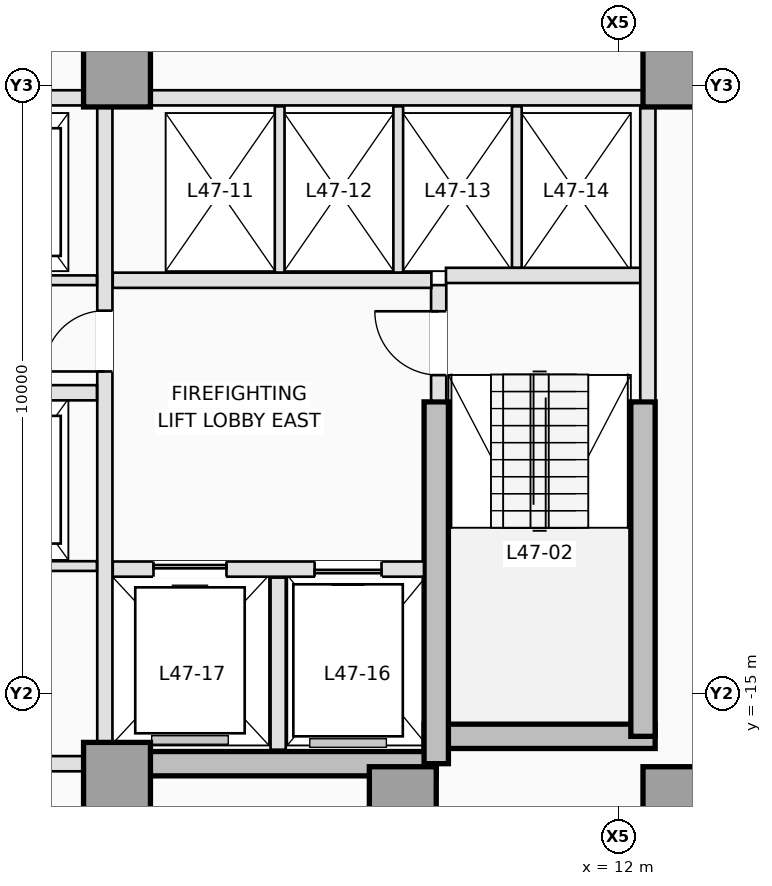
"""IFC4 building model, lengths in metres.
Left out: names, types, materials, properties, quantities, classifications, styles, units other than length and angle.
Written with IfcOpenShell. Run it as: python <this file> out.ifc"""

import sys

from ifc_helpers import new_model, si_unit, direction, frame, frame_2d, origin, origin_2d, place, context, subcontext, project, spatial, rectangle, extrude, element, fill, save


model = new_model("IFC4")
c1 = context("Model", 3, precision=1e-05, world=origin(), true_north=direction((0.0, 1.0)))
c2 = subcontext(c1, "Body", "Model", "MODEL_VIEW")
j1 = project(units=[si_unit("LENGTHUNIT", "METRE"), si_unit("PLANEANGLEUNIT", "RADIAN")], contexts=[c1])
p1 = place(None, origin())
s1 = spatial("IfcSite", under=j1, at=p1, CompositionType="ELEMENT")
p2 = place(p1, origin())
s2 = spatial("IfcBuilding", under=s1, at=p2, CompositionType="ELEMENT")
p3 = place(p2, frame((0.0, 0.0, 172.0)))
s3 = spatial("IfcBuildingStorey", under=s2, at=p3, CompositionType="ELEMENT", Elevation=172.0)
p4 = place(p3, frame((3.75, -16.15, 0.0), z_axis=(0.0, 0.0, 1.0), x_axis=(1.0, 0.0, 0.0)))
e1 = element("IfcWall", 1, at=p4, inside=s3, PredefinedType="SHEAR", context=c2, shape_type="SweptSolid", body=[
    extrude(rectangle(XDim=5.25, YDim=0.4, at=frame_2d((2.625, 0.0))), origin(), (0.0, 0.0, 1.0), 3.5),
])
p5 = place(p3, frame((8.8, -15.7, 0.0), z_axis=(0.0, 0.0, 1.0), x_axis=(1.0, 0.0, 0.0)))
e2 = element("IfcWall", 2, at=p5, inside=s3, PredefinedType="SHEAR", context=c2, shape_type="SweptSolid", body=[
    extrude(rectangle(XDim=3.8, YDim=0.4, at=frame_2d((1.9, 0.0))), origin(), (0.0, 0.0, 1.0), 3.5),
])
p6 = place(p3, frame((12.4, -15.7, 0.0), z_axis=(0.0, 0.0, 1.0), x_axis=(0.0, 1.0, 0.0)))
e3 = element("IfcWall", 3, at=p6, inside=s3, PredefinedType="SHEAR", context=c2, shape_type="SweptSolid", body=[
    extrude(rectangle(XDim=5.5, YDim=0.4, at=frame_2d((2.75, 0.0))), origin(), (0.0, 0.0, 1.0), 3.5),
])
p7 = place(p3, frame((9.0, -16.15, 0.0), z_axis=(0.0, 0.0, 1.0), x_axis=(0.0, 1.0, 0.0)))
e4 = element("IfcWall", 4, at=p7, inside=s3, PredefinedType="SHEAR", context=c2, shape_type="SweptSolid", body=[
    extrude(rectangle(XDim=5.95, YDim=0.4, at=frame_2d((2.975, 0.0))), origin(), (0.0, 0.0, 1.0), 3.5),
])
for number, where, z_axis, x_axis in (
    (5, (3.75, -16.35, 0.0), (0.0, 0.0, 1.0), (1.0, 0.0, 0.0)),
    (6, (8.45, -16.75, 0.0), (0.0, 0.0, 1.0), (1.0, 0.0, 0.0)),
    (7, (12.95, -16.75, 0.0), (0.0, 0.0, 1.0), (1.0, 0.0, 0.0)),
    (8, (3.75, -4.8, 0.0), (0.0, 0.0, 1.0), (1.0, 0.0, 0.0)),
    (9, (12.95, -4.8, 0.0), (0.0, 0.0, 1.0), (1.0, 0.0, 0.0)),
):
    element("IfcColumn", number, at=place(p3, frame(where, z_axis=z_axis, x_axis=x_axis)), inside=s3, PredefinedType="COLUMN", context=c2, shape_type="SweptSolid", body=[
        extrude(rectangle(XDim=1.1, YDim=1.1, at=origin_2d()), origin(), (0.0, 0.0, 1.0), 3.5),
    ])
p8 = place(p3, frame((9.04, -10.18, 0.0), z_axis=(0.0, 0.0, 1.0), x_axis=(0.0, 1.0, 0.0)))
e10 = element("IfcWall", 10, at=p8, inside=s3, PredefinedType="PARTITIONING", context=c2, shape_type="SweptSolid", body=[
    extrude(rectangle(XDim=1.9, YDim=0.25, at=frame_2d((0.95, 0.0))), origin(), (0.0, 0.0, 1.0), 3.25),
])
p9 = place(p8, frame((0.42, 0.0, 0.0)))
e11 = element("IfcOpeningElement", 11, at=p9, cuts=e10, PredefinedType="OPENING", context=c2, shape_type="SweptSolid", body=[
    extrude(rectangle(XDim=1.05, YDim=2.15, at=frame_2d((0.525, 1.075))), frame((0.0, 0.135, 0.0), z_axis=(0.0, -1.0, 0.0), x_axis=(1.0, 0.0, 0.0)), (0.0, 0.0, 1.0), 0.27),
])
p10 = place(p3, frame((9.16, -8.12, 0.0), z_axis=(0.0, 0.0, 1.0), x_axis=(1.0, 0.0, 0.0)))
e12 = element("IfcWall", 12, at=p10, inside=s3, PredefinedType="PARTITIONING", context=c2, shape_type="SweptSolid", body=[
    extrude(rectangle(XDim=3.22, YDim=0.25, at=frame_2d((1.61, 0.0))), origin(), (0.0, 0.0, 1.0), 3.25),
])
p11 = place(p3, frame((12.48, -10.18, 0.0), z_axis=(0.0, 0.0, 1.0), x_axis=(0.0, 1.0, 0.0)))
e13 = element("IfcWall", 13, at=p11, inside=s3, PredefinedType="PARTITIONING", context=c2, shape_type="SweptSolid", body=[
    extrude(rectangle(XDim=4.828, YDim=0.25, at=frame_2d((2.414, 0.0))), origin(), (0.0, 0.0, 1.0), 3.25),
])
p12 = place(p3, frame((3.68, -12.95, 0.0), z_axis=(0.0, 0.0, 1.0), x_axis=(1.0, 0.0, 0.0)))
e14 = element("IfcWall", 14, at=p12, inside=s3, PredefinedType="PARTITIONING", context=c2, shape_type="SweptSolid", body=[
    extrude(rectangle(XDim=5.118, YDim=0.25, at=frame_2d((2.559, 0.0))), origin(), (0.0, 0.0, 1.0), 3.25),
])
p13 = place(p12, frame((3.32, 0.0, 0.0)))
e15 = element("IfcOpeningElement", 15, at=p13, cuts=e14, PredefinedType="OPENING", context=c2, shape_type="SweptSolid", body=[
    extrude(rectangle(XDim=1.1, YDim=2.15, at=frame_2d((0.55, 1.075))), frame((0.0, 0.135, 0.0), z_axis=(0.0, -1.0, 0.0), x_axis=(1.0, 0.0, 0.0)), (0.0, 0.0, 1.0), 0.27),
])
p14 = place(p12, frame((0.67, 0.0, 0.0)))
e16 = element("IfcOpeningElement", 16, at=p14, cuts=e14, PredefinedType="OPENING", context=c2, shape_type="SweptSolid", body=[
    extrude(rectangle(XDim=1.2, YDim=2.15, at=frame_2d((0.6, 1.075))), frame((0.0, 0.135, 0.0), z_axis=(0.0, -1.0, 0.0), x_axis=(1.0, 0.0, 0.0)), (0.0, 0.0, 1.0), 0.27),
])
p15 = place(p3, frame((6.4, -15.92, 0.0), z_axis=(0.0, 0.0, 1.0), x_axis=(0.0, 1.0, 0.0)))
e17 = element("IfcWall", 17, at=p15, inside=s3, PredefinedType="PARTITIONING", context=c2, shape_type="SweptSolid", body=[
    extrude(rectangle(XDim=2.83, YDim=0.25, at=frame_2d((1.415, 0.0))), origin(), (0.0, 0.0, 1.0), 3.25),
])
p16 = place(p3, frame((3.68, -8.2, 0.0), z_axis=(0.0, 0.0, 1.0), x_axis=(1.0, 0.0, 0.0)))
e18 = element("IfcWall", 18, at=p16, inside=s3, PredefinedType="PARTITIONING", context=c2, shape_type="SweptSolid", body=[
    extrude(rectangle(XDim=5.24, YDim=0.25, at=frame_2d((2.62, 0.0))), origin(), (0.0, 0.0, 1.0), 3.25),
])
p17 = place(p3, frame((3.55, -15.798, 0.0), z_axis=(0.0, 0.0, 1.0), x_axis=(0.0, 1.0, 0.0)))
e19 = element("IfcWall", 19, at=p17, inside=s3, PredefinedType="PARTITIONING", context=c2, shape_type="SweptSolid", body=[
    extrude(rectangle(XDim=10.446, YDim=0.25, at=frame_2d((5.223, 0.0))), origin(), (0.0, 0.0, 1.0), 3.25),
])
p18 = place(p17, frame((6.098, 0.0, 0.0)))
e20 = element("IfcOpeningElement", 20, at=p18, cuts=e19, PredefinedType="OPENING", context=c2, shape_type="SweptSolid", body=[
    extrude(rectangle(XDim=1.0, YDim=2.15, at=frame_2d((0.5, 1.075))), frame((0.0, 0.135, 0.0), z_axis=(0.0, -1.0, 0.0), x_axis=(1.0, 0.0, 0.0)), (0.0, 0.0, 1.0), 0.27),
])
p19 = place(p3, frame((4.302, -5.2, 0.0), z_axis=(0.0, 0.0, 1.0), x_axis=(1.0, 0.0, 0.0)))
e21 = element("IfcWall", 21, at=p19, inside=s3, PredefinedType="PARTITIONING", context=c2, shape_type="SweptSolid", body=[
    extrude(rectangle(XDim=8.096, YDim=0.25, at=frame_2d((4.048, 0.0))), origin(), (0.0, 0.0, 1.0), 3.25),
])
p20 = place(p3, frame((0.95, -5.2, 0.0), z_axis=(0.0, 0.0, 1.0), x_axis=(1.0, 0.0, 0.0)))
e22 = element("IfcWall", 22, at=p20, inside=s3, PredefinedType="PARTITIONING", context=c2, shape_type="SweptSolid", body=[
    extrude(rectangle(XDim=2.248, YDim=0.25, at=frame_2d((1.124, 0.0))), origin(), (0.0, 0.0, 1.0), 3.25),
])
p21 = place(p20, frame((0.55, 0.0, 0.0)))
e23 = element("IfcOpeningElement", 23, at=p21, cuts=e22, PredefinedType="OPENING", context=c2, shape_type="SweptSolid", body=[
    extrude(rectangle(XDim=1.0, YDim=2.15, at=frame_2d((0.5, 1.075))), frame((0.0, 0.135, 0.0), z_axis=(0.0, -1.0, 0.0), x_axis=(1.0, 0.0, 0.0)), (0.0, 0.0, 1.0), 0.27),
])
for number, where, z_axis, x_axis in (
    (24, (6.425, -8.073, 0.0), (0.0, 0.0, 1.0), (0.0, 1.0, 0.0)),
    (25, (8.375, -8.073, 0.0), (0.0, 0.0, 1.0), (0.0, 1.0, 0.0)),
):
    element("IfcWall", number, at=place(p3, frame(where, z_axis=z_axis, x_axis=x_axis)), inside=s3, PredefinedType="PARTITIONING", context=c2, shape_type="SweptSolid", body=[
        extrude(rectangle(XDim=2.733, YDim=0.16, at=frame_2d((1.366, 0.0))), origin(), (0.0, 0.0, 1.0), 3.25),
    ])
p22 = place(p3, frame((10.325, -7.993, 0.0), z_axis=(0.0, 0.0, 1.0), x_axis=(0.0, 1.0, 0.0)))
e26 = element("IfcWall", 26, at=p22, inside=s3, PredefinedType="PARTITIONING", context=c2, shape_type="SweptSolid", body=[
    extrude(rectangle(XDim=2.653, YDim=0.16, at=frame_2d((1.326, 0.0))), origin(), (0.0, 0.0, 1.0), 3.25),
])
p23 = place(p3, frame((-3.198, -16.15, 0.0), z_axis=(0.0, 0.0, 1.0), x_axis=(1.0, 0.0, 0.0)))
e27 = element("IfcWall", 27, at=p23, inside=s3, PredefinedType="PARTITIONING", context=c2, shape_type="SweptSolid", body=[
    extrude(rectangle(XDim=6.396, YDim=0.25, at=frame_2d((3.198, 0.0))), origin(), (0.0, 0.0, 1.0), 2.45),
])
p24 = place(p3, frame((0.95, -8.2, 0.0), z_axis=(0.0, 0.0, 1.0), x_axis=(1.0, 0.0, 0.0)))
e28 = element("IfcWall", 28, at=p24, inside=s3, PredefinedType="PARTITIONING", context=c2, shape_type="SweptSolid", body=[
    extrude(rectangle(XDim=2.47, YDim=0.16, at=frame_2d((1.235, 0.0))), origin(), (0.0, 0.0, 1.0), 3.25),
])
p25 = place(p3, frame((0.95, -10.05, 0.0), z_axis=(0.0, 0.0, 1.0), x_axis=(1.0, 0.0, 0.0)))
e29 = element("IfcWall", 29, at=p25, inside=s3, PredefinedType="PARTITIONING", context=c2, shape_type="SweptSolid", body=[
    extrude(rectangle(XDim=2.47, YDim=0.25, at=frame_2d((1.235, 0.0))), origin(), (0.0, 0.0, 1.0), 3.25),
])
p26 = place(p25, frame((0.55, 0.0, 0.0)))
e30 = element("IfcOpeningElement", 30, at=p26, cuts=e29, PredefinedType="OPENING", context=c2, shape_type="SweptSolid", body=[
    extrude(rectangle(XDim=1.0, YDim=2.15, at=frame_2d((0.5, 1.075))), frame((0.0, 0.135, 0.0), z_axis=(0.0, -1.0, 0.0), x_axis=(1.0, 0.0, 0.0)), (0.0, 0.0, 1.0), 0.27),
])
p27 = place(p3, frame((-3.42, -12.9, 0.0), z_axis=(0.0, 0.0, 1.0), x_axis=(1.0, 0.0, 0.0)))
e31 = element("IfcWall", 31, at=p27, inside=s3, PredefinedType="PARTITIONING", context=c2, shape_type="SweptSolid", body=[
    extrude(rectangle(XDim=6.84, YDim=0.16, at=frame_2d((3.42, 0.0))), origin(), (0.0, 0.0, 1.0), 3.25),
])
p28 = place(p27, frame((2.98, 0.0, 0.0)))
e32 = element("IfcOpeningElement", 32, at=p28, cuts=e31, PredefinedType="OPENING", context=c2, shape_type="SweptSolid", body=[
    extrude(rectangle(XDim=0.88, YDim=2.12, at=frame_2d((0.44, 1.06))), frame((0.0, 0.09, 0.0), z_axis=(0.0, -1.0, 0.0), x_axis=(1.0, 0.0, 0.0)), (0.0, 0.0, 1.0), 0.18),
])
p29 = place(p13, origin())
e33 = element("IfcDoor", 33, at=p29, inside=s3, OperationType="SLIDING_TO_RIGHT", PredefinedType="DOOR", context=c2, shape_type="SweptSolid", body=[
    extrude(rectangle(XDim=1.1, YDim=2.15, at=frame_2d((0.55, 1.075))), frame((0.0, 0.025, 0.0), z_axis=(0.0, -1.0, 0.0), x_axis=(1.0, 0.0, 0.0)), (0.0, 0.0, 1.0), 0.05),
])
fill(e15, e33)
p30 = place(p14, origin())
e34 = element("IfcDoor", 34, at=p30, inside=s3, OperationType="SLIDING_TO_LEFT", PredefinedType="DOOR", context=c2, shape_type="SweptSolid", body=[
    extrude(rectangle(XDim=1.2, YDim=2.15, at=frame_2d((0.6, 1.075))), frame((0.0, 0.025, 0.0), z_axis=(0.0, -1.0, 0.0), x_axis=(1.0, 0.0, 0.0)), (0.0, 0.0, 1.0), 0.05),
])
fill(e16, e34)
p31 = place(p9, origin())
e35 = element("IfcDoor", 35, at=p31, inside=s3, OperationType="SINGLE_SWING_RIGHT", PredefinedType="DOOR", context=c2, shape_type="SweptSolid", body=[
    extrude(rectangle(XDim=1.05, YDim=2.15, at=frame_2d((0.525, 1.075))), frame((0.0, 0.025, 0.0), z_axis=(0.0, -1.0, 0.0), x_axis=(1.0, 0.0, 0.0)), (0.0, 0.0, 1.0), 0.05),
])
fill(e11, e35)
p32 = place(p18, origin())
e36 = element("IfcDoor", 36, at=p32, inside=s3, OperationType="SINGLE_SWING_LEFT", PredefinedType="DOOR", context=c2, shape_type="SweptSolid", body=[
    extrude(rectangle(XDim=1.0, YDim=2.15, at=frame_2d((0.5, 1.075))), frame((0.0, 0.025, 0.0), z_axis=(0.0, -1.0, 0.0), x_axis=(1.0, 0.0, 0.0)), (0.0, 0.0, 1.0), 0.05),
])
fill(e20, e36)
save(model, sys.argv[1])
